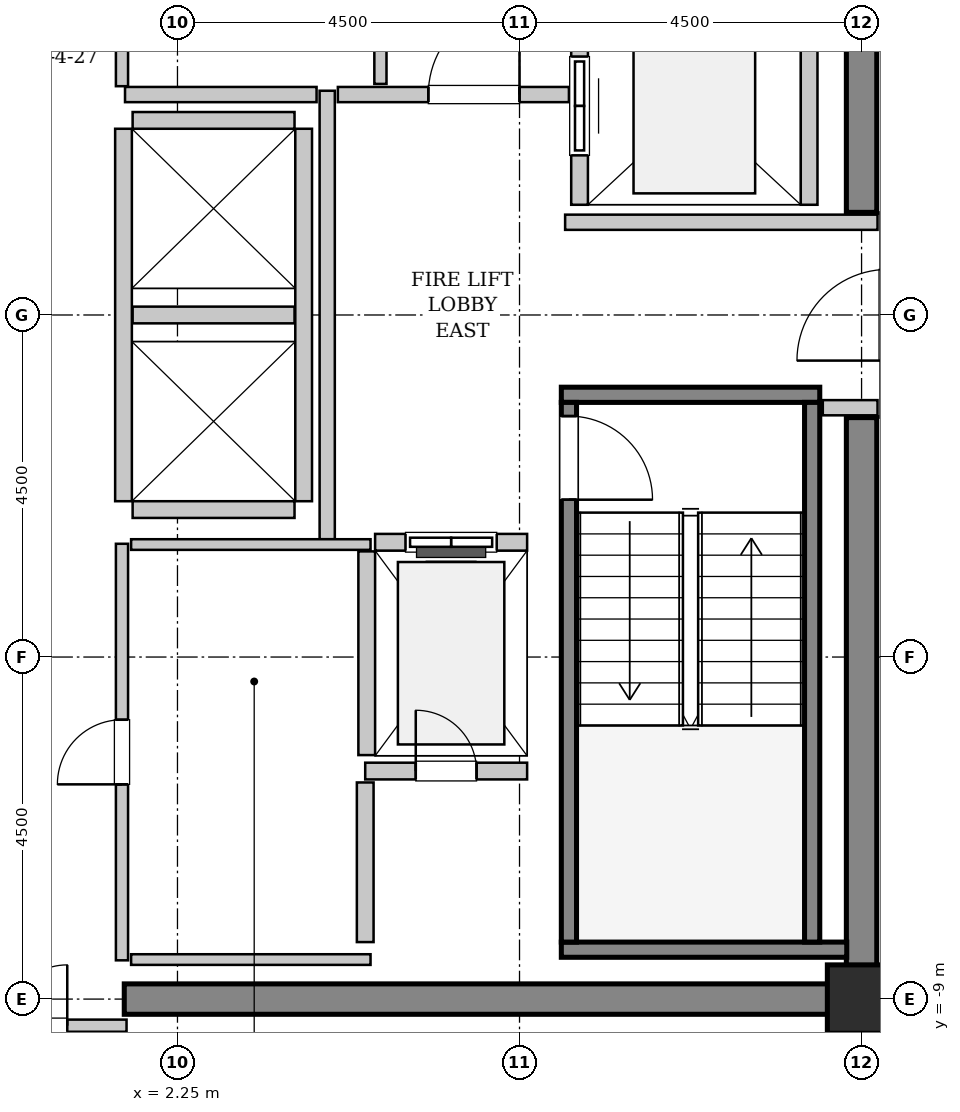
"""IFC4 building model, lengths in metres.
Left out: names, types, materials, properties, quantities, classifications, styles, units other than length and angle.
Written with IfcOpenShell. Run it as: python <this file> out.ifc"""

import sys

from ifc_helpers import new_model, si_unit, direction, frame, frame_2d, origin, origin_2d, place, context, subcontext, project, spatial, rectangle, extrude, source, transform, mapped, element, fill, save


model = new_model("IFC4")
c1 = context("Model", 3, precision=1e-05, world=origin(), true_north=direction((0.0, 1.0)))
c2 = subcontext(c1, "Body", "Model", "MODEL_VIEW")
j1 = project(units=[si_unit("LENGTHUNIT", "METRE"), si_unit("PLANEANGLEUNIT", "RADIAN")], contexts=[c1])
p1 = place(None, origin())
s1 = spatial("IfcSite", under=j1, at=p1, CompositionType="ELEMENT")
p2 = place(p1, origin())
s2 = spatial("IfcBuilding", under=s1, at=p2, CompositionType="ELEMENT")
p3 = place(p2, frame((0.0, 0.0, 322.4)))
s3 = spatial("IfcBuildingStorey", under=s2, at=p3, CompositionType="ELEMENT", Elevation=322.4)
m1 = source(origin(), c2, "Body", "SweptSolid", [
    extrude(rectangle(XDim=9.9, YDim=0.4, at=frame_2d((4.95, 0.0))), origin(), (0.0, 0.0, 1.0), 3.8),
])
p4 = place(p3, frame((1.55, -9.0, 0.0), z_axis=(0.0, 0.0, 1.0), x_axis=(1.0, 0.0, 0.0)))
e1 = element("IfcWall", 1, at=p4, inside=s3, PredefinedType="SHEAR", context=c2, shape_type="MappedRepresentation", body=[
    mapped(m1, transform((0.0, 0.0, 0.0), x_axis=(1.0, 0.0, 0.0), y_axis=(0.0, 1.0, 0.0), z_axis=(0.0, 0.0, 1.0), scale=1.0)),
])
m2 = source(origin(), c2, "Body", "SweptSolid", [
    extrude(rectangle(XDim=7.45, YDim=0.4, at=frame_2d((3.725, 0.0))), origin(), (0.0, 0.0, 1.0), 3.8),
])
for number, where, z_axis, x_axis in (
    (2, (11.25, -8.8, 0.0), (0.0, 0.0, 1.0), (0.0, 1.0, 0.0)),
    (3, (11.25, 1.35, 0.0), (0.0, 0.0, 1.0), (0.0, 1.0, 0.0)),
):
    element("IfcWall", number, at=place(p3, frame(where, z_axis=z_axis, x_axis=x_axis)), inside=s3, PredefinedType="SHEAR", context=c2, shape_type="MappedRepresentation", body=[
        mapped(m2, transform((0.0, 0.0, 0.0), x_axis=(1.0, 0.0, 0.0), y_axis=(0.0, 1.0, 0.0), z_axis=(0.0, 0.0, 1.0), scale=1.0)),
    ])
m3 = source(origin(), c2, "Body", "SweptSolid", [
    extrude(rectangle(XDim=0.9, YDim=0.9, at=origin_2d()), origin(), (0.0, 0.0, 1.0), 3.8),
])
p5 = place(p3, frame((11.25, -9.0, 0.0), z_axis=(0.0, 0.0, 1.0), x_axis=(1.0, 0.0, 0.0)))
e4 = element("IfcColumn", 4, at=p5, inside=s3, PredefinedType="COLUMN", context=c2, shape_type="MappedRepresentation", body=[
    mapped(m3, transform((0.0, 0.0, 0.0), x_axis=(1.0, 0.0, 0.0), y_axis=(0.0, 1.0, 0.0), z_axis=(0.0, 0.0, 1.0), scale=1.0)),
])
m4 = source(origin(), c2, "Body", "SweptSolid", [
    extrude(rectangle(XDim=3.4, YDim=0.2, at=frame_2d((1.7, 0.0))), origin(), (0.0, 0.0, 1.0), 3.8),
])
p6 = place(p3, frame((7.3, -1.05, 0.0), z_axis=(0.0, 0.0, 1.0), x_axis=(1.0, 0.0, 0.0)))
e5 = element("IfcWall", 5, at=p6, inside=s3, PredefinedType="SOLIDWALL", context=c2, shape_type="MappedRepresentation", body=[
    mapped(m4, transform((0.0, 0.0, 0.0), x_axis=(1.0, 0.0, 0.0), y_axis=(0.0, 1.0, 0.0), z_axis=(0.0, 0.0, 1.0), scale=1.0)),
])
m5 = source(origin(), c2, "Body", "SweptSolid", [
    extrude(rectangle(XDim=3.755, YDim=0.2, at=frame_2d((1.877, 0.0))), origin(), (0.0, 0.0, 1.0), 3.8),
])
p7 = place(p3, frame((7.3, -8.35, 0.0), z_axis=(0.0, 0.0, 1.0), x_axis=(1.0, 0.0, 0.0)))
e6 = element("IfcWall", 6, at=p7, inside=s3, PredefinedType="SOLIDWALL", context=c2, shape_type="MappedRepresentation", body=[
    mapped(m5, transform((0.0, 0.0, 0.0), x_axis=(1.0, 0.0, 0.0), y_axis=(0.0, 1.0, 0.0), z_axis=(0.0, 0.0, 1.0), scale=1.0)),
])
m6 = source(origin(), c2, "Body", "SweptSolid", [
    extrude(rectangle(XDim=7.1, YDim=0.2, at=frame_2d((3.55, 0.0))), origin(), (0.0, 0.0, 1.0), 3.8),
])
p8 = place(p3, frame((7.4, -1.15, 0.0), z_axis=(0.0, 0.0, 1.0), x_axis=(0.0, -1.0, 0.0)))
e7 = element("IfcWall", 7, at=p8, inside=s3, PredefinedType="SOLIDWALL", context=c2, shape_type="MappedRepresentation", body=[
    mapped(m6, transform((0.0, 0.0, 0.0), x_axis=(1.0, 0.0, 0.0), y_axis=(0.0, 1.0, 0.0), z_axis=(0.0, 0.0, 1.0), scale=1.0)),
])
p9 = place(p8, frame((0.18, 0.0, 0.0)))
e8 = element("IfcOpeningElement", 8, at=p9, cuts=e7, PredefinedType="OPENING", context=c2, shape_type="SweptSolid", body=[
    extrude(rectangle(XDim=1.1, YDim=2.15, at=frame_2d((0.55, 1.075))), frame((0.0, 0.11, 0.0), z_axis=(0.0, -1.0, 0.0), x_axis=(1.0, 0.0, 0.0)), (0.0, 0.0, 1.0), 0.22),
])
p10 = place(p3, frame((10.6, -1.15, 0.0), z_axis=(0.0, 0.0, 1.0), x_axis=(0.0, -1.0, 0.0)))
e9 = element("IfcWall", 9, at=p10, inside=s3, PredefinedType="SOLIDWALL", context=c2, shape_type="MappedRepresentation", body=[
    mapped(m6, transform((0.0, 0.0, 0.0), x_axis=(1.0, 0.0, 0.0), y_axis=(0.0, 1.0, 0.0), z_axis=(0.0, 0.0, 1.0), scale=1.0)),
])
m7 = source(origin(), c2, "Body", "SweptSolid", [
    extrude(rectangle(XDim=2.0, YDim=0.22, at=frame_2d((1.0, 0.0))), origin(), (0.0, 0.0, 1.0), 3.535),
])
p11 = place(p3, frame((6.85, -2.99, 0.0), z_axis=(0.0, 0.0, 1.0), x_axis=(-1.0, 0.0, 0.0)))
e10 = element("IfcWall", 10, at=p11, inside=s3, PredefinedType="SOLIDWALL", context=c2, shape_type="MappedRepresentation", body=[
    mapped(m7, transform((0.0, 0.0, 0.0), x_axis=(1.0, 0.0, 0.0), y_axis=(0.0, 1.0, 0.0), z_axis=(0.0, 0.0, 1.0), scale=1.0)),
])
p12 = place(p11, frame((0.4, 0.0, 0.0)))
e11 = element("IfcOpeningElement", 11, at=p12, cuts=e10, PredefinedType="OPENING", context=c2, shape_type="SweptSolid", body=[
    extrude(rectangle(XDim=1.2, YDim=2.2, at=frame_2d((0.6, 1.1))), frame((0.0, 0.12, 0.0), z_axis=(0.0, -1.0, 0.0), x_axis=(1.0, 0.0, 0.0)), (0.0, 0.0, 1.0), 0.24),
])
m8 = source(origin(), c2, "Body", "SweptSolid", [
    extrude(rectangle(XDim=2.68, YDim=0.22, at=frame_2d((1.34, 0.0))), origin(), (0.0, 0.0, 1.0), 3.535),
])
p13 = place(p3, frame((4.74, -3.11, 0.0), z_axis=(0.0, 0.0, 1.0), x_axis=(0.0, -1.0, 0.0)))
e12 = element("IfcWall", 12, at=p13, inside=s3, PredefinedType="SOLIDWALL", context=c2, shape_type="MappedRepresentation", body=[
    mapped(m8, transform((0.0, 0.0, 0.0), x_axis=(1.0, 0.0, 0.0), y_axis=(0.0, 1.0, 0.0), z_axis=(0.0, 0.0, 1.0), scale=1.0)),
])
m9 = source(origin(), c2, "Body", "SweptSolid", [
    extrude(rectangle(XDim=5.45, YDim=0.22, at=frame_2d((2.725, 0.0))), origin(), (0.0, 0.0, 1.0), 3.535),
])
p14 = place(p3, frame((7.54, 6.9, 0.0), z_axis=(0.0, 0.0, 1.0), x_axis=(0.0, -1.0, 0.0)))
e13 = element("IfcWall", 13, at=p14, inside=s3, PredefinedType="SOLIDWALL", context=c2, shape_type="MappedRepresentation", body=[
    mapped(m9, transform((0.0, 0.0, 0.0), x_axis=(1.0, 0.0, 0.0), y_axis=(0.0, 1.0, 0.0), z_axis=(0.0, 0.0, 1.0), scale=1.0)),
])
p15 = place(p14, frame((3.5, 0.0, 0.0)))
e14 = element("IfcOpeningElement", 14, at=p15, cuts=e13, PredefinedType="OPENING", context=c2, shape_type="SweptSolid", body=[
    extrude(rectangle(XDim=1.3, YDim=2.3, at=frame_2d((0.65, 1.15))), frame((0.0, 0.12, 0.0), z_axis=(0.0, -1.0, 0.0), x_axis=(1.0, 0.0, 0.0)), (0.0, 0.0, 1.0), 0.24),
])
p16 = place(p14, frame((0.65, 0.0, 0.0)))
e15 = element("IfcOpeningElement", 15, at=p16, cuts=e13, PredefinedType="OPENING", context=c2, shape_type="SweptSolid", body=[
    extrude(rectangle(XDim=1.3, YDim=2.3, at=frame_2d((0.65, 1.15))), frame((0.0, 0.12, 0.0), z_axis=(0.0, -1.0, 0.0), x_axis=(1.0, 0.0, 0.0)), (0.0, 0.0, 1.0), 0.24),
])
p17 = place(p3, frame((10.56, 1.45, 0.0), z_axis=(0.0, 0.0, 1.0), x_axis=(0.0, 1.0, 0.0)))
e16 = element("IfcWall", 16, at=p17, inside=s3, PredefinedType="SOLIDWALL", context=c2, shape_type="MappedRepresentation", body=[
    mapped(m9, transform((0.0, 0.0, 0.0), x_axis=(1.0, 0.0, 0.0), y_axis=(0.0, 1.0, 0.0), z_axis=(0.0, 0.0, 1.0), scale=1.0)),
])
m10 = source(origin(), c2, "Body", "SweptSolid", [
    extrude(rectangle(XDim=4.9, YDim=0.22, at=frame_2d((2.45, 0.0))), origin(), (0.0, 0.0, 1.0), 3.535),
])
for number, where, z_axis, x_axis in (
    (17, (1.54, 2.45, 0.0), (0.0, 0.0, 1.0), (0.0, -1.0, 0.0)),
    (18, (3.91, -2.45, 0.0), (0.0, 0.0, 1.0), (0.0, 1.0, 0.0)),
):
    element("IfcWall", number, at=place(p3, frame(where, z_axis=z_axis, x_axis=x_axis)), inside=s3, PredefinedType="SOLIDWALL", context=c2, shape_type="MappedRepresentation", body=[
        mapped(m10, transform((0.0, 0.0, 0.0), x_axis=(1.0, 0.0, 0.0), y_axis=(0.0, 1.0, 0.0), z_axis=(0.0, 0.0, 1.0), scale=1.0)),
    ])
m11 = source(origin(), c2, "Body", "SweptSolid", [
    extrude(rectangle(XDim=2.13, YDim=0.22, at=frame_2d((1.065, 0.0))), origin(), (0.0, 0.0, 1.0), 3.535),
])
for number, where, z_axis, x_axis in (
    (19, (1.66, -2.56, 0.0), (0.0, 0.0, 1.0), (1.0, 0.0, 0.0)),
    (20, (1.66, 0.0, 0.0), (0.0, 0.0, 1.0), (1.0, 0.0, 0.0)),
    (21, (3.79, 2.56, 0.0), (0.0, 0.0, 1.0), (-1.0, 0.0, 0.0)),
):
    element("IfcWall", number, at=place(p3, frame(where, z_axis=z_axis, x_axis=x_axis)), inside=s3, PredefinedType="SOLIDWALL", context=c2, shape_type="MappedRepresentation", body=[
        mapped(m11, transform((0.0, 0.0, 0.0), x_axis=(1.0, 0.0, 0.0), y_axis=(0.0, 1.0, 0.0), z_axis=(0.0, 0.0, 1.0), scale=1.0)),
    ])
p18 = place(p3, frame((4.72, -6.0, 0.0), z_axis=(0.0, 0.0, 1.0), x_axis=(1.0, 0.0, 0.0)))
e22 = element("IfcWall", 22, at=p18, inside=s3, PredefinedType="SOLIDWALL", context=c2, shape_type="MappedRepresentation", body=[
    mapped(m11, transform((0.0, 0.0, 0.0), x_axis=(1.0, 0.0, 0.0), y_axis=(0.0, 1.0, 0.0), z_axis=(0.0, 0.0, 1.0), scale=1.0)),
])
p19 = place(p18, frame((0.665, 0.0, 0.0)))
e23 = element("IfcOpeningElement", 23, at=p19, cuts=e22, PredefinedType="OPENING", context=c2, shape_type="SweptSolid", body=[
    extrude(rectangle(XDim=0.8, YDim=2.0, at=frame_2d((0.4, 1.0))), frame((0.0, 0.12, 0.0), z_axis=(0.0, -1.0, 0.0), x_axis=(1.0, 0.0, 0.0)), (0.0, 0.0, 1.0), 0.24),
])
m12 = source(origin(), c2, "Body", "SweptSolid", [
    extrude(rectangle(XDim=2.1, YDim=0.22, at=frame_2d((1.05, 0.0))), origin(), (0.0, 0.0, 1.0), 3.535),
])
p20 = place(p3, frame((4.72, -8.25, 0.0), z_axis=(0.0, 0.0, 1.0), x_axis=(0.0, 1.0, 0.0)))
e24 = element("IfcWall", 24, at=p20, inside=s3, PredefinedType="SOLIDWALL", context=c2, shape_type="MappedRepresentation", body=[
    mapped(m12, transform((0.0, 0.0, 0.0), x_axis=(1.0, 0.0, 0.0), y_axis=(0.0, 1.0, 0.0), z_axis=(0.0, 0.0, 1.0), scale=1.0)),
])
m13 = source(origin(), c2, "Body", "SweptSolid", [
    extrude(rectangle(XDim=5.9, YDim=0.2, at=frame_2d((2.95, 0.0))), origin(), (0.0, 0.0, 1.0), 3.535),
])
p21 = place(p3, frame((4.22, -2.95, 0.0), z_axis=(0.0, 0.0, 1.0), x_axis=(0.0, 1.0, 0.0)))
e25 = element("IfcWall", 25, at=p21, inside=s3, PredefinedType="PARTITIONING", context=c2, shape_type="MappedRepresentation", body=[
    mapped(m13, transform((0.0, 0.0, 0.0), x_axis=(1.0, 0.0, 0.0), y_axis=(0.0, 1.0, 0.0), z_axis=(0.0, 0.0, 1.0), scale=1.0)),
])
m14 = source(origin(), c2, "Body", "SweptSolid", [
    extrude(rectangle(XDim=2.52, YDim=0.2, at=frame_2d((1.26, 0.0))), origin(), (0.0, 0.0, 1.0), 3.535),
])
p22 = place(p3, frame((1.56, 2.9, 0.0), z_axis=(0.0, 0.0, 1.0), x_axis=(1.0, 0.0, 0.0)))
e26 = element("IfcWall", 26, at=p22, inside=s3, PredefinedType="PARTITIONING", context=c2, shape_type="MappedRepresentation", body=[
    mapped(m14, transform((0.0, 0.0, 0.0), x_axis=(1.0, 0.0, 0.0), y_axis=(0.0, 1.0, 0.0), z_axis=(0.0, 0.0, 1.0), scale=1.0)),
])
m15 = source(origin(), c2, "Body", "SweptSolid", [
    extrude(rectangle(XDim=3.04, YDim=0.2, at=frame_2d((1.52, 0.0))), origin(), (0.0, 0.0, 1.0), 3.535),
])
p23 = place(p3, frame((4.36, 2.9, 0.0), z_axis=(0.0, 0.0, 1.0), x_axis=(1.0, 0.0, 0.0)))
e27 = element("IfcWall", 27, at=p23, inside=s3, PredefinedType="PARTITIONING", context=c2, shape_type="MappedRepresentation", body=[
    mapped(m15, transform((0.0, 0.0, 0.0), x_axis=(1.0, 0.0, 0.0), y_axis=(0.0, 1.0, 0.0), z_axis=(0.0, 0.0, 1.0), scale=1.0)),
])
p24 = place(p23, frame((1.19, 0.0, 0.0)))
e28 = element("IfcOpeningElement", 28, at=p24, cuts=e27, PredefinedType="OPENING", context=c2, shape_type="SweptSolid", body=[
    extrude(rectangle(XDim=1.2, YDim=2.15, at=frame_2d((0.6, 1.075))), frame((0.0, 0.11, 0.0), z_axis=(0.0, -1.0, 0.0), x_axis=(1.0, 0.0, 0.0)), (0.0, 0.0, 1.0), 0.22),
])
m16 = source(origin(), c2, "Body", "SweptSolid", [
    extrude(rectangle(XDim=4.11, YDim=0.2, at=frame_2d((2.055, 0.0))), origin(), (0.0, 0.0, 1.0), 3.535),
])
p25 = place(p3, frame((7.35, 1.22, 0.0), z_axis=(0.0, 0.0, 1.0), x_axis=(1.0, 0.0, 0.0)))
e29 = element("IfcWall", 29, at=p25, inside=s3, PredefinedType="PARTITIONING", context=c2, shape_type="MappedRepresentation", body=[
    mapped(m16, transform((0.0, 0.0, 0.0), x_axis=(1.0, 0.0, 0.0), y_axis=(0.0, 1.0, 0.0), z_axis=(0.0, 0.0, 1.0), scale=1.0)),
])
m17 = source(origin(), c2, "Body", "SweptSolid", [
    extrude(rectangle(XDim=0.72, YDim=0.2, at=frame_2d((0.36, 0.0))), origin(), (0.0, 0.0, 1.0), 3.535),
])
p26 = place(p3, frame((10.74, -1.22, 0.0), z_axis=(0.0, 0.0, 1.0), x_axis=(1.0, 0.0, 0.0)))
e30 = element("IfcWall", 30, at=p26, inside=s3, PredefinedType="PARTITIONING", context=c2, shape_type="MappedRepresentation", body=[
    mapped(m17, transform((0.0, 0.0, 0.0), x_axis=(1.0, 0.0, 0.0), y_axis=(0.0, 1.0, 0.0), z_axis=(0.0, 0.0, 1.0), scale=1.0)),
])
m18 = source(origin(), c2, "Body", "SweptSolid", [
    extrude(rectangle(XDim=3.16, YDim=0.16, at=frame_2d((1.58, 0.0))), origin(), (0.0, 0.0, 1.0), 2.625),
])
p27 = place(p3, frame((-1.58, -9.35, 0.0), z_axis=(0.0, 0.0, 1.0), x_axis=(1.0, 0.0, 0.0)))
e31 = element("IfcWall", 31, at=p27, inside=s3, PredefinedType="PARTITIONING", context=c2, shape_type="MappedRepresentation", body=[
    mapped(m18, transform((0.0, 0.0, 0.0), x_axis=(1.0, 0.0, 0.0), y_axis=(0.0, 1.0, 0.0), z_axis=(0.0, 0.0, 1.0), scale=1.0)),
])
p28 = place(p27, frame((0.78, 0.0, 0.0)))
e32 = element("IfcOpeningElement", 32, at=p28, cuts=e31, PredefinedType="OPENING", context=c2, shape_type="SweptSolid", body=[
    extrude(rectangle(XDim=1.6, YDim=2.3, at=frame_2d((0.8, 1.15))), frame((0.0, 0.09, 0.0), z_axis=(0.0, -1.0, 0.0), x_axis=(1.0, 0.0, 0.0)), (0.0, 0.0, 1.0), 0.18),
])
m19 = source(origin(), c2, "Body", "SweptSolid", [
    extrude(rectangle(XDim=5.45, YDim=0.16, at=frame_2d((2.725, 0.0))), origin(), (0.0, 0.0, 1.0), 3.535),
])
p29 = place(p3, frame((4.92, 3.04, 0.0), z_axis=(0.0, 0.0, 1.0), x_axis=(0.0, 1.0, 0.0)))
e33 = element("IfcWall", 33, at=p29, inside=s3, PredefinedType="PARTITIONING", context=c2, shape_type="MappedRepresentation", body=[
    mapped(m19, transform((0.0, 0.0, 0.0), x_axis=(1.0, 0.0, 0.0), y_axis=(0.0, 1.0, 0.0), z_axis=(0.0, 0.0, 1.0), scale=1.0)),
])
m20 = source(origin(), c2, "Body", "SweptSolid", [
    extrude(rectangle(XDim=5.48, YDim=0.16, at=frame_2d((2.74, 0.0))), origin(), (0.0, 0.0, 1.0), 3.535),
])
p30 = place(p3, frame((1.52, 3.01, 0.0), z_axis=(0.0, 0.0, 1.0), x_axis=(0.0, 1.0, 0.0)))
e34 = element("IfcWall", 34, at=p30, inside=s3, PredefinedType="PARTITIONING", context=c2, shape_type="MappedRepresentation", body=[
    mapped(m20, transform((0.0, 0.0, 0.0), x_axis=(1.0, 0.0, 0.0), y_axis=(0.0, 1.0, 0.0), z_axis=(0.0, 0.0, 1.0), scale=1.0)),
])
p31 = place(p30, frame((2.315, 0.0, 0.0)))
e35 = element("IfcOpeningElement", 35, at=p31, cuts=e34, PredefinedType="OPENING", context=c2, shape_type="SweptSolid", body=[
    extrude(rectangle(XDim=0.85, YDim=2.1, at=frame_2d((0.425, 1.05))), frame((0.0, 0.09, 0.0), z_axis=(0.0, -1.0, 0.0), x_axis=(1.0, 0.0, 0.0)), (0.0, 0.0, 1.0), 0.18),
])
p32 = place(p3, frame((1.52, -8.49, 0.0), z_axis=(0.0, 0.0, 1.0), x_axis=(0.0, 1.0, 0.0)))
e36 = element("IfcWall", 36, at=p32, inside=s3, PredefinedType="PARTITIONING", context=c2, shape_type="MappedRepresentation", body=[
    mapped(m20, transform((0.0, 0.0, 0.0), x_axis=(1.0, 0.0, 0.0), y_axis=(0.0, 1.0, 0.0), z_axis=(0.0, 0.0, 1.0), scale=1.0)),
])
p33 = place(p32, frame((2.315, 0.0, 0.0)))
e37 = element("IfcOpeningElement", 37, at=p33, cuts=e36, PredefinedType="OPENING", context=c2, shape_type="SweptSolid", body=[
    extrude(rectangle(XDim=0.85, YDim=2.1, at=frame_2d((0.425, 1.05))), frame((0.0, 0.09, 0.0), z_axis=(0.0, -1.0, 0.0), x_axis=(1.0, 0.0, 0.0)), (0.0, 0.0, 1.0), 0.18),
])
m21 = source(origin(), c2, "Body", "SweptSolid", [
    extrude(rectangle(XDim=3.15, YDim=0.14, at=frame_2d((1.575, 0.0))), origin(), (0.0, 0.0, 1.0), 3.535),
])
for number, where, z_axis, x_axis in (
    (38, (1.64, -3.02, 0.0), (0.0, 0.0, 1.0), (1.0, 0.0, 0.0)),
    (39, (1.64, -8.48, 0.0), (0.0, 0.0, 1.0), (1.0, 0.0, 0.0)),
):
    element("IfcWall", number, at=place(p3, frame(where, z_axis=z_axis, x_axis=x_axis)), inside=s3, PredefinedType="PARTITIONING", context=c2, shape_type="MappedRepresentation", body=[
        mapped(m21, transform((0.0, 0.0, 0.0), x_axis=(1.0, 0.0, 0.0), y_axis=(0.0, 1.0, 0.0), z_axis=(0.0, 0.0, 1.0), scale=1.0)),
    ])
m22 = source(origin(), c2, "Body", "SweptSolid", [
    extrude(rectangle(XDim=1.1, YDim=2.15, at=frame_2d((0.55, 1.075))), frame((0.0, 0.025, 0.0), z_axis=(0.0, -1.0, 0.0), x_axis=(1.0, 0.0, 0.0)), (0.0, 0.0, 1.0), 0.05),
])
p34 = place(p9, origin())
e40 = element("IfcDoor", 40, at=p34, inside=s3, OperationType="SINGLE_SWING_RIGHT", PredefinedType="DOOR", context=c2, shape_type="MappedRepresentation", body=[
    mapped(m22, transform((0.0, 0.0, 0.0), x_axis=(1.0, 0.0, 0.0), y_axis=(0.0, 1.0, 0.0), z_axis=(0.0, 0.0, 1.0), scale=1.0)),
])
fill(e8, e40)
m23 = source(origin(), c2, "Body", "SweptSolid", [
    extrude(rectangle(XDim=1.2, YDim=2.2, at=frame_2d((0.6, 1.1))), frame((0.0, 0.025, 0.0), z_axis=(0.0, -1.0, 0.0), x_axis=(1.0, 0.0, 0.0)), (0.0, 0.0, 1.0), 0.05),
])
p35 = place(p12, origin())
e41 = element("IfcDoor", 41, at=p35, inside=s3, OperationType="SLIDING_TO_LEFT", PredefinedType="DOOR", context=c2, shape_type="MappedRepresentation", body=[
    mapped(m23, transform((0.0, 0.0, 0.0), x_axis=(1.0, 0.0, 0.0), y_axis=(0.0, 1.0, 0.0), z_axis=(0.0, 0.0, 1.0), scale=1.0)),
])
fill(e11, e41)
m24 = source(origin(), c2, "Body", "SweptSolid", [
    extrude(rectangle(XDim=1.3, YDim=2.3, at=frame_2d((0.65, 1.15))), frame((0.0, 0.025, 0.0), z_axis=(0.0, -1.0, 0.0), x_axis=(1.0, 0.0, 0.0)), (0.0, 0.0, 1.0), 0.05),
])
p36 = place(p15, origin())
e42 = element("IfcDoor", 42, at=p36, inside=s3, OperationType="SLIDING_TO_RIGHT", PredefinedType="DOOR", context=c2, shape_type="MappedRepresentation", body=[
    mapped(m24, transform((0.0, 0.0, 0.0), x_axis=(1.0, 0.0, 0.0), y_axis=(0.0, 1.0, 0.0), z_axis=(0.0, 0.0, 1.0), scale=1.0)),
])
fill(e14, e42)
m25 = source(origin(), c2, "Body", "SweptSolid", [
    extrude(rectangle(XDim=0.8, YDim=2.0, at=frame_2d((0.4, 1.0))), frame((0.0, 0.025, 0.0), z_axis=(0.0, -1.0, 0.0), x_axis=(1.0, 0.0, 0.0)), (0.0, 0.0, 1.0), 0.05),
])
p37 = place(p19, origin())
e43 = element("IfcDoor", 43, at=p37, inside=s3, OperationType="SINGLE_SWING_LEFT", PredefinedType="TRAPDOOR", context=c2, shape_type="MappedRepresentation", body=[
    mapped(m25, transform((0.0, 0.0, 0.0), x_axis=(1.0, 0.0, 0.0), y_axis=(0.0, 1.0, 0.0), z_axis=(0.0, 0.0, 1.0), scale=1.0)),
])
fill(e23, e43)
m26 = source(origin(), c2, "Body", "SweptSolid", [
    extrude(rectangle(XDim=1.2, YDim=2.15, at=frame_2d((0.6, 1.075))), frame((0.0, 0.025, 0.0), z_axis=(0.0, -1.0, 0.0), x_axis=(1.0, 0.0, 0.0)), (0.0, 0.0, 1.0), 0.05),
])
p38 = place(p24, origin())
e44 = element("IfcDoor", 44, at=p38, inside=s3, OperationType="SINGLE_SWING_RIGHT", PredefinedType="DOOR", context=c2, shape_type="MappedRepresentation", body=[
    mapped(m26, transform((0.0, 0.0, 0.0), x_axis=(1.0, 0.0, 0.0), y_axis=(0.0, 1.0, 0.0), z_axis=(0.0, 0.0, 1.0), scale=1.0)),
])
fill(e28, e44)
m27 = source(origin(), c2, "Body", "SweptSolid", [
    extrude(rectangle(XDim=1.6, YDim=2.3, at=frame_2d((0.8, 1.15))), frame((0.0, 0.025, 0.0), z_axis=(0.0, -1.0, 0.0), x_axis=(1.0, 0.0, 0.0)), (0.0, 0.0, 1.0), 0.05),
])
p39 = place(p28, origin())
e45 = element("IfcDoor", 45, at=p39, inside=s3, OperationType="DOUBLE_DOOR_SINGLE_SWING", PredefinedType="DOOR", context=c2, shape_type="MappedRepresentation", body=[
    mapped(m27, transform((0.0, 0.0, 0.0), x_axis=(1.0, 0.0, 0.0), y_axis=(0.0, 1.0, 0.0), z_axis=(0.0, 0.0, 1.0), scale=1.0)),
])
fill(e32, e45)
m28 = source(origin(), c2, "Body", "SweptSolid", [
    extrude(rectangle(XDim=0.85, YDim=2.1, at=frame_2d((0.425, 1.05))), frame((0.0, 0.025, 0.0), z_axis=(0.0, -1.0, 0.0), x_axis=(1.0, 0.0, 0.0)), (0.0, 0.0, 1.0), 0.05),
])
p40 = place(p33, origin())
e46 = element("IfcDoor", 46, at=p40, inside=s3, OperationType="SINGLE_SWING_LEFT", PredefinedType="DOOR", context=c2, shape_type="MappedRepresentation", body=[
    mapped(m28, transform((0.0, 0.0, 0.0), x_axis=(1.0, 0.0, 0.0), y_axis=(0.0, 1.0, 0.0), z_axis=(0.0, 0.0, 1.0), scale=1.0)),
])
fill(e37, e46)
save(model, sys.argv[1])
